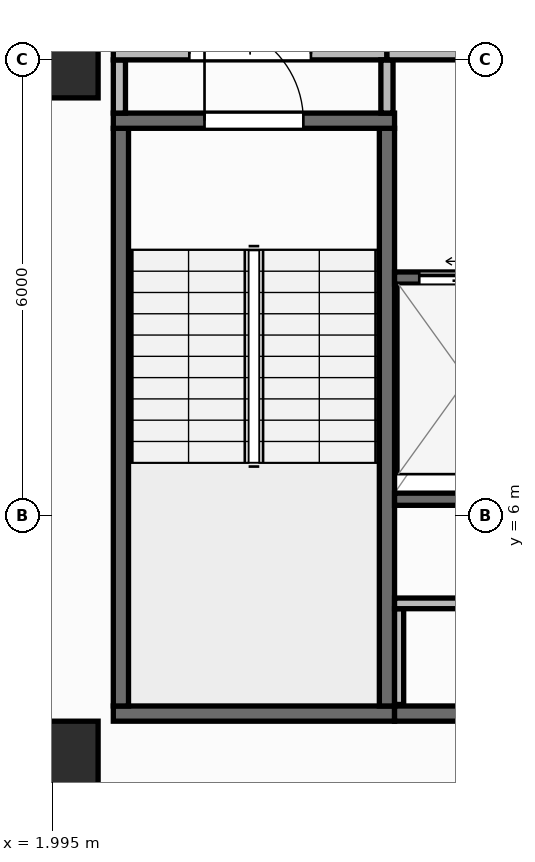
"""IFC4 building model, lengths in metres.
Left out: names, types, materials, properties, quantities, classifications, styles, units other than length and angle.
Written with IfcOpenShell. Run it as: python <this file> out.ifc"""

import sys

from ifc_helpers import new_model, si_unit, direction, frame, frame_2d, origin, origin_2d, place, context, subcontext, project, spatial, rectangle, extrude, element, fill, save


model = new_model("IFC4")
c1 = context("Model", 3, precision=1e-05, world=origin(), true_north=direction((0.0, 1.0)))
c2 = subcontext(c1, "Body", "Model", "MODEL_VIEW")
j1 = project(units=[si_unit("LENGTHUNIT", "METRE"), si_unit("PLANEANGLEUNIT", "RADIAN")], contexts=[c1])
p1 = place(None, origin())
s1 = spatial("IfcSite", under=j1, at=p1, CompositionType="ELEMENT")
p2 = place(p1, origin())
s2 = spatial("IfcBuilding", under=s1, at=p2, CompositionType="ELEMENT")
p3 = place(p2, frame((0.0, 0.0, 231.6)))
s3 = spatial("IfcBuildingStorey", under=s2, at=p3, CompositionType="ELEMENT", Elevation=231.6)
for number, where, z_axis, x_axis in (
    (1, (2.1, 2.8, 0.0), (0.0, 0.0, 1.0), (1.0, 0.0, 0.0)),
    (2, (2.1, 12.0, 0.0), (0.0, 0.0, 1.0), (1.0, 0.0, 0.0)),
):
    element("IfcColumn", number, at=place(p3, frame(where, z_axis=z_axis, x_axis=x_axis)), inside=s3, PredefinedType="COLUMN", context=c2, shape_type="SweptSolid", body=[
        extrude(rectangle(XDim=1.0, YDim=1.0, at=origin_2d()), origin(), (0.0, 0.0, 1.0), 3.95),
    ])
p4 = place(p3, frame((2.66, 0.174, 0.0), z_axis=(0.0, 0.0, 1.0), x_axis=(0.996634028439, 0.081979347142, 0.0)))
e3 = element("IfcWall", 3, at=p4, inside=s3, PredefinedType="STANDARD", context=c2, shape_type="SweptSolid", body=[
    extrude(rectangle(XDim=46.035, YDim=0.26, at=frame_2d((23.018, 0.0))), origin(), (0.0, 0.0, 1.0), 3.67),
])
p5 = place(p4, frame((21.817, 0.0, 0.9)))
e4 = element("IfcOpeningElement", 4, at=p5, cuts=e3, PredefinedType="OPENING", context=c2, shape_type="SweptSolid", body=[
    extrude(rectangle(XDim=2.4, YDim=1.65, at=frame_2d((1.2, 0.825))), frame((0.0, 0.14, 0.0), z_axis=(0.0, -1.0, 0.0), x_axis=(1.0, 0.0, 0.0)), (0.0, 0.0, 1.0), 0.28),
])
p6 = place(p3, frame((2.8, 3.4, 0.0), z_axis=(0.0, 0.0, 1.0), x_axis=(1.0, 0.0, 0.0)))
e5 = element("IfcWall", 5, at=p6, inside=s3, PredefinedType="SHEAR", context=c2, shape_type="SweptSolid", body=[
    extrude(rectangle(XDim=3.7, YDim=0.2, at=frame_2d((1.85, 0.0))), origin(), (0.0, 0.0, 1.0), 3.67),
])
for number, where, z_axis, x_axis in (
    (6, (2.9, 3.5, 0.0), (0.0, 0.0, 1.0), (0.0, 1.0, 0.0)),
    (7, (6.4, 3.5, 0.0), (0.0, 0.0, 1.0), (0.0, 1.0, 0.0)),
):
    element("IfcWall", number, at=place(p3, frame(where, z_axis=z_axis, x_axis=x_axis)), inside=s3, PredefinedType="SHEAR", context=c2, shape_type="SweptSolid", body=[
        extrude(rectangle(XDim=7.6, YDim=0.2, at=frame_2d((3.8, 0.0))), origin(), (0.0, 0.0, 1.0), 3.67),
    ])
p7 = place(p3, frame((2.8, 11.2, 0.0), z_axis=(0.0, 0.0, 1.0), x_axis=(1.0, 0.0, 0.0)))
e8 = element("IfcWall", 8, at=p7, inside=s3, PredefinedType="SHEAR", context=c2, shape_type="SweptSolid", body=[
    extrude(rectangle(XDim=3.7, YDim=0.2, at=frame_2d((1.85, 0.0))), origin(), (0.0, 0.0, 1.0), 3.67),
])
p8 = place(p7, frame((1.2, 0.0, 0.0)))
e9 = element("IfcOpeningElement", 9, at=p8, cuts=e8, PredefinedType="OPENING", context=c2, shape_type="SweptSolid", body=[
    extrude(rectangle(XDim=1.3, YDim=2.15, at=frame_2d((0.65, 1.075))), frame((0.0, 0.11, 0.0), z_axis=(0.0, -1.0, 0.0), x_axis=(1.0, 0.0, 0.0)), (0.0, 0.0, 1.0), 0.22),
])
p9 = place(p3, frame((6.5, 3.4, 0.0), z_axis=(0.0, 0.0, 1.0), x_axis=(1.0, 0.0, 0.0)))
e10 = element("IfcWall", 10, at=p9, inside=s3, PredefinedType="SHEAR", context=c2, shape_type="SweptSolid", body=[
    extrude(rectangle(XDim=13.7, YDim=0.2, at=frame_2d((6.85, 0.0))), origin(), (0.0, 0.0, 1.0), 3.67),
])
p10 = place(p3, frame((6.5, 6.22, 0.0), z_axis=(0.0, 0.0, 1.0), x_axis=(1.0, 0.0, 0.0)))
e11 = element("IfcWall", 11, at=p10, inside=s3, PredefinedType="SHEAR", context=c2, shape_type="SweptSolid", body=[
    extrude(rectangle(XDim=12.11, YDim=0.16, at=frame_2d((6.055, 0.0))), origin(), (0.0, 0.0, 1.0), 3.67),
])
p11 = place(p3, frame((6.5, 9.13, 0.0), z_axis=(0.0, 0.0, 1.0), x_axis=(1.0, 0.0, 0.0)))
e12 = element("IfcWall", 12, at=p11, inside=s3, PredefinedType="SHEAR", context=c2, shape_type="SweptSolid", body=[
    extrude(rectangle(XDim=1.975, YDim=0.16, at=frame_2d((0.988, 0.0))), origin(), (0.0, 0.0, 1.0), 3.67),
])
p12 = place(p11, frame((0.325, 0.0, 0.0)))
e13 = element("IfcOpeningElement", 13, at=p12, cuts=e12, PredefinedType="OPENING", context=c2, shape_type="SweptSolid", body=[
    extrude(rectangle(XDim=1.25, YDim=2.15, at=frame_2d((0.625, 1.075))), frame((0.0, 0.09, 0.0), z_axis=(0.0, -1.0, 0.0), x_axis=(1.0, 0.0, 0.0)), (0.0, 0.0, 1.0), 0.18),
])
p13 = place(p3, frame((6.56, 3.52, 0.0), z_axis=(0.0, 0.0, 1.0), x_axis=(0.0, 1.0, 0.0)))
e14 = element("IfcWall", 14, at=p13, inside=s3, PredefinedType="PARTITIONING", context=c2, shape_type="SweptSolid", body=[
    extrude(rectangle(XDim=1.26, YDim=0.12, at=frame_2d((0.63, 0.0))), origin(), (0.0, 0.0, 1.0), 3.67),
])
p14 = place(p3, frame((6.5, 4.85, 0.0), z_axis=(0.0, 0.0, 1.0), x_axis=(1.0, 0.0, 0.0)))
e15 = element("IfcWall", 15, at=p14, inside=s3, PredefinedType="PARTITIONING", context=c2, shape_type="SweptSolid", body=[
    extrude(rectangle(XDim=5.67, YDim=0.14, at=frame_2d((2.835, 0.0))), origin(), (0.0, 0.0, 1.0), 3.67),
])
p15 = place(p14, frame((2.285, 0.0, 0.0)))
e16 = element("IfcOpeningElement", 16, at=p15, cuts=e15, PredefinedType="OPENING", context=c2, shape_type="SweptSolid", body=[
    extrude(rectangle(XDim=1.1, YDim=2.1, at=frame_2d((0.55, 1.05))), frame((0.0, 0.08, 0.0), z_axis=(0.0, -1.0, 0.0), x_axis=(1.0, 0.0, 0.0)), (0.0, 0.0, 1.0), 0.16),
])
p16 = place(p3, frame((2.88, 11.3, 0.0), z_axis=(0.0, 0.0, 1.0), x_axis=(0.0, 1.0, 0.0)))
e17 = element("IfcWall", 17, at=p16, inside=s3, PredefinedType="PARTITIONING", context=c2, shape_type="SweptSolid", body=[
    extrude(rectangle(XDim=0.7, YDim=0.16, at=frame_2d((0.35, 0.0))), origin(), (0.0, 0.0, 1.0), 3.67),
])
p17 = place(p3, frame((2.8, 12.08, 0.0), z_axis=(0.0, 0.0, 1.0), x_axis=(1.0, 0.0, 0.0)))
e18 = element("IfcWall", 18, at=p17, inside=s3, PredefinedType="PARTITIONING", context=c2, shape_type="SweptSolid", body=[
    extrude(rectangle(XDim=3.6, YDim=0.16, at=frame_2d((1.8, 0.0))), origin(), (0.0, 0.0, 1.0), 3.112),
])
p18 = place(p17, frame((1.0, 0.0, 0.0)))
e19 = element("IfcOpeningElement", 19, at=p18, cuts=e18, PredefinedType="OPENING", context=c2, shape_type="SweptSolid", body=[
    extrude(rectangle(XDim=1.6, YDim=2.05, at=frame_2d((0.8, 1.025))), frame((0.0, 0.09, 0.0), z_axis=(0.0, -1.0, 0.0), x_axis=(1.0, 0.0, 0.0)), (0.0, 0.0, 1.0), 0.18),
])
p19 = place(p3, frame((6.4, 11.3, 0.0), z_axis=(0.0, 0.0, 1.0), x_axis=(0.0, 1.0, 0.0)))
e20 = element("IfcWall", 20, at=p19, inside=s3, PredefinedType="PARTITIONING", context=c2, shape_type="SweptSolid", body=[
    extrude(rectangle(XDim=0.7, YDim=0.16, at=frame_2d((0.35, 0.0))), origin(), (0.0, 0.0, 1.0), 3.67),
])
p20 = place(p3, frame((6.4, 12.08, 0.0), z_axis=(0.0, 0.0, 1.0), x_axis=(1.0, 0.0, 0.0)))
e21 = element("IfcWall", 21, at=p20, inside=s3, PredefinedType="PARTITIONING", context=c2, shape_type="SweptSolid", body=[
    extrude(rectangle(XDim=6.18, YDim=0.16, at=frame_2d((3.09, 0.0))), origin(), (0.0, 0.0, 1.0), 3.112),
])
p21 = place(p20, frame((2.29, 0.0, 0.0)))
e22 = element("IfcOpeningElement", 22, at=p21, cuts=e21, PredefinedType="OPENING", context=c2, shape_type="SweptSolid", body=[
    extrude(rectangle(XDim=1.6, YDim=2.05, at=frame_2d((0.8, 1.025))), frame((0.0, 0.09, 0.0), z_axis=(0.0, -1.0, 0.0), x_axis=(1.0, 0.0, 0.0)), (0.0, 0.0, 1.0), 0.18),
])
p22 = place(p8, origin())
e23 = element("IfcDoor", 23, at=p22, inside=s3, OperationType="SINGLE_SWING_LEFT", PredefinedType="DOOR", context=c2, shape_type="SweptSolid", body=[
    extrude(rectangle(XDim=1.3, YDim=2.15, at=frame_2d((0.65, 1.075))), frame((0.0, 0.025, 0.0), z_axis=(0.0, -1.0, 0.0), x_axis=(1.0, 0.0, 0.0)), (0.0, 0.0, 1.0), 0.05),
])
fill(e9, e23)
p23 = place(p12, origin())
e24 = element("IfcDoor", 24, at=p23, inside=s3, OperationType="SLIDING_TO_LEFT", PredefinedType="DOOR", context=c2, shape_type="SweptSolid", body=[
    extrude(rectangle(XDim=1.25, YDim=2.15, at=frame_2d((0.625, 1.075))), frame((0.0, 0.025, 0.0), z_axis=(0.0, -1.0, 0.0), x_axis=(1.0, 0.0, 0.0)), (0.0, 0.0, 1.0), 0.05),
])
fill(e13, e24)
p24 = place(p18, origin())
e25 = element("IfcDoor", 25, at=p24, inside=s3, OperationType="DOUBLE_DOOR_SINGLE_SWING", PredefinedType="DOOR", context=c2, shape_type="SweptSolid", body=[
    extrude(rectangle(XDim=1.6, YDim=2.05, at=frame_2d((0.8, 1.025))), frame((0.0, 0.025, 0.0), z_axis=(0.0, -1.0, 0.0), x_axis=(1.0, 0.0, 0.0)), (0.0, 0.0, 1.0), 0.05),
])
fill(e19, e25)
save(model, sys.argv[1])
